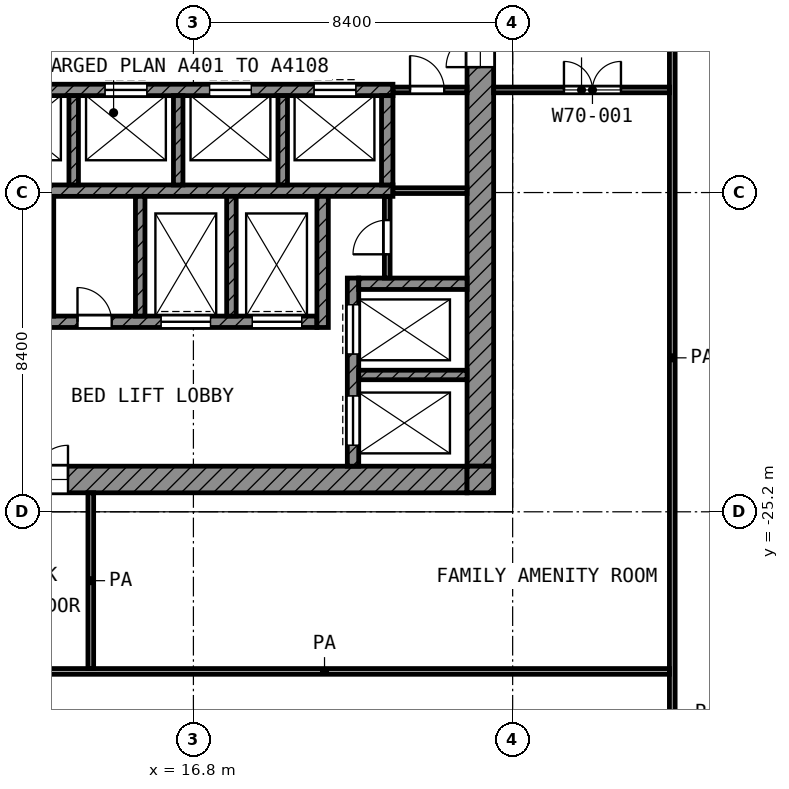
"""IFC4 building model, lengths in metres.
Left out: names, types, materials, properties, quantities, classifications, styles, units other than length and angle.
Written with IfcOpenShell. Run it as: python <this file> out.ifc"""

import sys

from ifc_helpers import new_model, si_unit, direction, frame, frame_2d, origin, place, context, subcontext, project, spatial, rectangle, extrude, element, fill, save


model = new_model("IFC4")
c1 = context("Model", 3, precision=1e-05, world=origin(), true_north=direction((0.0, 1.0)))
c2 = subcontext(c1, "Body", "Model", "MODEL_VIEW")
j1 = project(units=[si_unit("LENGTHUNIT", "METRE"), si_unit("PLANEANGLEUNIT", "RADIAN")], contexts=[c1])
p1 = place(None, origin())
s1 = spatial("IfcSite", under=j1, at=p1, CompositionType="ELEMENT")
p2 = place(p1, origin())
s2 = spatial("IfcBuilding", under=s1, at=p2, CompositionType="ELEMENT")
p3 = place(p2, frame((0.0, 0.0, 302.8)))
s3 = spatial("IfcBuildingStorey", under=s2, at=p3, CompositionType="ELEMENT", Elevation=302.8)
p4 = place(p3, frame((24.35, -24.0, 0.0), z_axis=(0.0, 0.0, 1.0), x_axis=(0.0, 1.0, 0.0)))
e1 = element("IfcWall", 1, at=p4, inside=s3, PredefinedType="SHEAR", context=c2, shape_type="SweptSolid", body=[
    extrude(rectangle(XDim=18.6, YDim=0.7, at=frame_2d((9.3, 0.0))), origin(), (0.0, 0.0, 1.0), 3.6),
])
p5 = place(p4, frame((10.5, 0.0, 0.0)))
e2 = element("IfcOpeningElement", 2, at=p5, cuts=e1, PredefinedType="OPENING", context=c2, shape_type="SweptSolid", body=[
    extrude(rectangle(XDim=1.8, YDim=2.1, at=frame_2d((0.9, 1.05))), frame((0.0, 0.36, 0.0), z_axis=(0.0, -1.0, 0.0), x_axis=(1.0, 0.0, 0.0)), (0.0, 0.0, 1.0), 0.72),
])
p6 = place(p3, frame((5.4, -24.35, 0.0), z_axis=(0.0, 0.0, 1.0), x_axis=(1.0, 0.0, 0.0)))
e3 = element("IfcWall", 3, at=p6, inside=s3, PredefinedType="SHEAR", context=c2, shape_type="SweptSolid", body=[
    extrude(rectangle(XDim=18.6, YDim=0.7, at=frame_2d((9.3, 0.0))), origin(), (0.0, 0.0, 1.0), 3.6),
])
p7 = place(p6, frame((6.3, 0.0, 0.0)))
e4 = element("IfcOpeningElement", 4, at=p7, cuts=e3, PredefinedType="OPENING", context=c2, shape_type="SweptSolid", body=[
    extrude(rectangle(XDim=1.8, YDim=2.1, at=frame_2d((0.9, 1.05))), frame((0.0, 0.36, 0.0), z_axis=(0.0, -1.0, 0.0), x_axis=(1.0, 0.0, 0.0)), (0.0, 0.0, 1.0), 0.72),
])
p8 = place(p3, frame((24.35, -24.7, 0.0), z_axis=(0.0, 0.0, 1.0), x_axis=(0.0, 1.0, 0.0)))
e5 = element("IfcWall", 5, at=p8, inside=s3, PredefinedType="SHEAR", context=c2, shape_type="SweptSolid", body=[
    extrude(rectangle(XDim=0.7, YDim=0.7, at=frame_2d((0.35, 0.0))), origin(), (0.0, 0.0, 1.0), 3.6),
])
p9 = place(p3, frame((5.4, -14.1, 0.0), z_axis=(0.0, 0.0, 1.0), x_axis=(1.0, 0.0, 0.0)))
e6 = element("IfcWall", 6, at=p9, inside=s3, PredefinedType="SHEAR", context=c2, shape_type="SweptSolid", body=[
    extrude(rectangle(XDim=16.65, YDim=0.3, at=frame_2d((8.325, 0.0))), origin(), (0.0, 0.0, 1.0), 3.6),
])
p10 = place(p9, frame((6.325, 0.0, 0.0)))
e7 = element("IfcOpeningElement", 7, at=p10, cuts=e6, PredefinedType="OPENING", context=c2, shape_type="SweptSolid", body=[
    extrude(rectangle(XDim=1.1, YDim=2.1, at=frame_2d((0.55, 1.05))), frame((0.0, 0.16, 0.0), z_axis=(0.0, -1.0, 0.0), x_axis=(1.0, 0.0, 0.0)), (0.0, 0.0, 1.0), 0.32),
])
p11 = place(p9, frame((9.075, 0.0, 0.0)))
e8 = element("IfcOpeningElement", 8, at=p11, cuts=e6, PredefinedType="OPENING", context=c2, shape_type="SweptSolid", body=[
    extrude(rectangle(XDim=1.1, YDim=2.1, at=frame_2d((0.55, 1.05))), frame((0.0, 0.16, 0.0), z_axis=(0.0, -1.0, 0.0), x_axis=(1.0, 0.0, 0.0)), (0.0, 0.0, 1.0), 0.32),
])
p12 = place(p9, frame((11.825, 0.0, 0.0)))
e9 = element("IfcOpeningElement", 9, at=p12, cuts=e6, PredefinedType="OPENING", context=c2, shape_type="SweptSolid", body=[
    extrude(rectangle(XDim=1.1, YDim=2.1, at=frame_2d((0.55, 1.05))), frame((0.0, 0.16, 0.0), z_axis=(0.0, -1.0, 0.0), x_axis=(1.0, 0.0, 0.0)), (0.0, 0.0, 1.0), 0.32),
])
p13 = place(p9, frame((14.575, 0.0, 0.0)))
e10 = element("IfcOpeningElement", 10, at=p13, cuts=e6, PredefinedType="OPENING", context=c2, shape_type="SweptSolid", body=[
    extrude(rectangle(XDim=1.1, YDim=2.1, at=frame_2d((0.55, 1.05))), frame((0.0, 0.16, 0.0), z_axis=(0.0, -1.0, 0.0), x_axis=(1.0, 0.0, 0.0)), (0.0, 0.0, 1.0), 0.32),
])
p14 = place(p9, frame((2.3, 0.0, 0.0)))
e11 = element("IfcOpeningElement", 11, at=p14, cuts=e6, PredefinedType="OPENING", context=c2, shape_type="SweptSolid", body=[
    extrude(rectangle(XDim=0.9, YDim=2.1, at=frame_2d((0.45, 1.05))), frame((0.0, 0.16, 0.0), z_axis=(0.0, -1.0, 0.0), x_axis=(1.0, 0.0, 0.0)), (0.0, 0.0, 1.0), 0.32),
])
p15 = place(p3, frame((5.4, -16.75, 0.0), z_axis=(0.0, 0.0, 1.0), x_axis=(1.0, 0.0, 0.0)))
e12 = element("IfcWall", 12, at=p15, inside=s3, PredefinedType="SHEAR", context=c2, shape_type="SweptSolid", body=[
    extrude(rectangle(XDim=16.65, YDim=0.3, at=frame_2d((8.325, 0.0))), origin(), (0.0, 0.0, 1.0), 3.6),
])
p16 = place(p3, frame((5.4, -20.2, 0.0), z_axis=(0.0, 0.0, 1.0), x_axis=(1.0, 0.0, 0.0)))
e13 = element("IfcWall", 13, at=p16, inside=s3, PredefinedType="SHEAR", context=c2, shape_type="SweptSolid", body=[
    extrude(rectangle(XDim=14.65, YDim=0.3, at=frame_2d((7.325, 0.0))), origin(), (0.0, 0.0, 1.0), 3.6),
])
p17 = place(p16, frame((10.55, 0.0, 0.0)))
e14 = element("IfcOpeningElement", 14, at=p17, cuts=e13, PredefinedType="OPENING", context=c2, shape_type="SweptSolid", body=[
    extrude(rectangle(XDim=1.3, YDim=2.1, at=frame_2d((0.65, 1.05))), frame((0.0, 0.16, 0.0), z_axis=(0.0, -1.0, 0.0), x_axis=(1.0, 0.0, 0.0)), (0.0, 0.0, 1.0), 0.32),
])
p18 = place(p16, frame((12.95, 0.0, 0.0)))
e15 = element("IfcOpeningElement", 15, at=p18, cuts=e13, PredefinedType="OPENING", context=c2, shape_type="SweptSolid", body=[
    extrude(rectangle(XDim=1.3, YDim=2.1, at=frame_2d((0.65, 1.05))), frame((0.0, 0.16, 0.0), z_axis=(0.0, -1.0, 0.0), x_axis=(1.0, 0.0, 0.0)), (0.0, 0.0, 1.0), 0.32),
])
p19 = place(p16, frame((0.55, 0.0, 0.0)))
e16 = element("IfcOpeningElement", 16, at=p19, cuts=e13, PredefinedType="OPENING", context=c2, shape_type="SweptSolid", body=[
    extrude(rectangle(XDim=1.3, YDim=2.1, at=frame_2d((0.65, 1.05))), frame((0.0, 0.16, 0.0), z_axis=(0.0, -1.0, 0.0), x_axis=(1.0, 0.0, 0.0)), (0.0, 0.0, 1.0), 0.32),
])
p20 = place(p16, frame((2.95, 0.0, 0.0)))
e17 = element("IfcOpeningElement", 17, at=p20, cuts=e13, PredefinedType="OPENING", context=c2, shape_type="SweptSolid", body=[
    extrude(rectangle(XDim=1.3, YDim=2.1, at=frame_2d((0.65, 1.05))), frame((0.0, 0.16, 0.0), z_axis=(0.0, -1.0, 0.0), x_axis=(1.0, 0.0, 0.0)), (0.0, 0.0, 1.0), 0.32),
])
p21 = place(p16, frame((5.95, 0.0, 0.0)))
e18 = element("IfcOpeningElement", 18, at=p21, cuts=e13, PredefinedType="OPENING", context=c2, shape_type="SweptSolid", body=[
    extrude(rectangle(XDim=0.9, YDim=2.1, at=frame_2d((0.45, 1.05))), frame((0.0, 0.16, 0.0), z_axis=(0.0, -1.0, 0.0), x_axis=(1.0, 0.0, 0.0)), (0.0, 0.0, 1.0), 0.32),
])
p22 = place(p16, frame((8.35, 0.0, 0.0)))
e19 = element("IfcOpeningElement", 19, at=p22, cuts=e13, PredefinedType="OPENING", context=c2, shape_type="SweptSolid", body=[
    extrude(rectangle(XDim=0.9, YDim=2.1, at=frame_2d((0.45, 1.05))), frame((0.0, 0.16, 0.0), z_axis=(0.0, -1.0, 0.0), x_axis=(1.0, 0.0, 0.0)), (0.0, 0.0, 1.0), 0.32),
])
p23 = place(p3, frame((20.2, -20.35, 0.0), z_axis=(0.0, 0.0, 1.0), x_axis=(0.0, 1.0, 0.0)))
e20 = element("IfcWall", 20, at=p23, inside=s3, PredefinedType="SHEAR", context=c2, shape_type="SweptSolid", body=[
    extrude(rectangle(XDim=3.45, YDim=0.3, at=frame_2d((1.725, 0.0))), origin(), (0.0, 0.0, 1.0), 3.6),
])
p24 = place(p3, frame((21.9, -16.6, 0.0), z_axis=(0.0, 0.0, 1.0), x_axis=(0.0, 1.0, 0.0)))
e21 = element("IfcWall", 21, at=p24, inside=s3, PredefinedType="SHEAR", context=c2, shape_type="SweptSolid", body=[
    extrude(rectangle(XDim=2.35, YDim=0.3, at=frame_2d((1.175, 0.0))), origin(), (0.0, 0.0, 1.0), 3.6),
])
p25 = place(p3, frame((21.15, -19.2, 0.0), z_axis=(0.0, 0.0, 1.0), x_axis=(1.0, 0.0, 0.0)))
e22 = element("IfcWall", 22, at=p25, inside=s3, PredefinedType="SHEAR", context=c2, shape_type="SweptSolid", body=[
    extrude(rectangle(XDim=2.85, YDim=0.3, at=frame_2d((1.425, 0.0))), origin(), (0.0, 0.0, 1.0), 3.6),
])
p26 = place(p3, frame((21.0, -24.0, 0.0), z_axis=(0.0, 0.0, 1.0), x_axis=(0.0, 1.0, 0.0)))
e23 = element("IfcWall", 23, at=p26, inside=s3, PredefinedType="SHEAR", context=c2, shape_type="SweptSolid", body=[
    extrude(rectangle(XDim=4.95, YDim=0.3, at=frame_2d((2.475, 0.0))), origin(), (0.0, 0.0, 1.0), 3.6),
])
p27 = place(p26, frame((2.95, 0.0, 0.0)))
e24 = element("IfcOpeningElement", 24, at=p27, cuts=e23, PredefinedType="OPENING", context=c2, shape_type="SweptSolid", body=[
    extrude(rectangle(XDim=1.3, YDim=2.1, at=frame_2d((0.65, 1.05))), frame((0.0, 0.16, 0.0), z_axis=(0.0, -1.0, 0.0), x_axis=(1.0, 0.0, 0.0)), (0.0, 0.0, 1.0), 0.32),
])
p28 = place(p26, frame((0.55, 0.0, 0.0)))
e25 = element("IfcOpeningElement", 25, at=p28, cuts=e23, PredefinedType="OPENING", context=c2, shape_type="SweptSolid", body=[
    extrude(rectangle(XDim=1.3, YDim=2.1, at=frame_2d((0.65, 1.05))), frame((0.0, 0.16, 0.0), z_axis=(0.0, -1.0, 0.0), x_axis=(1.0, 0.0, 0.0)), (0.0, 0.0, 1.0), 0.32),
])
p29 = place(p3, frame((21.15, -21.6, 0.0), z_axis=(0.0, 0.0, 1.0), x_axis=(1.0, 0.0, 0.0)))
e26 = element("IfcWall", 26, at=p29, inside=s3, PredefinedType="SHEAR", context=c2, shape_type="SweptSolid", body=[
    extrude(rectangle(XDim=2.85, YDim=0.25, at=frame_2d((1.425, 0.0))), origin(), (0.0, 0.0, 1.0), 3.6),
])
for number, where, z_axis, x_axis in (
    (27, (13.0, -20.05, 0.0), (0.0, 0.0, 1.0), (0.0, 1.0, 0.0)),
    (28, (15.4, -20.05, 0.0), (0.0, 0.0, 1.0), (0.0, 1.0, 0.0)),
    (29, (17.8, -20.05, 0.0), (0.0, 0.0, 1.0), (0.0, 1.0, 0.0)),
):
    element("IfcWall", number, at=place(p3, frame(where, z_axis=z_axis, x_axis=x_axis)), inside=s3, PredefinedType="SHEAR", context=c2, shape_type="SweptSolid", body=[
        extrude(rectangle(XDim=3.15, YDim=0.25, at=frame_2d((1.575, 0.0))), origin(), (0.0, 0.0, 1.0), 3.6),
    ])
for number, where, z_axis, x_axis in (
    (30, (13.65, -16.6, 0.0), (0.0, 0.0, 1.0), (0.0, 1.0, 0.0)),
    (31, (16.4, -16.6, 0.0), (0.0, 0.0, 1.0), (0.0, 1.0, 0.0)),
    (32, (19.15, -16.6, 0.0), (0.0, 0.0, 1.0), (0.0, 1.0, 0.0)),
):
    element("IfcWall", number, at=place(p3, frame(where, z_axis=z_axis, x_axis=x_axis)), inside=s3, PredefinedType="SHEAR", context=c2, shape_type="SweptSolid", body=[
        extrude(rectangle(XDim=2.35, YDim=0.25, at=frame_2d((1.175, 0.0))), origin(), (0.0, 0.0, 1.0), 3.6),
    ])
p30 = place(p3, frame((21.9, -19.05, 0.0), z_axis=(0.0, 0.0, 1.0), x_axis=(0.0, 1.0, 0.0)))
e33 = element("IfcWall", 33, at=p30, inside=s3, PredefinedType="PARTITIONING", context=c2, shape_type="SweptSolid", body=[
    extrude(rectangle(XDim=2.15, YDim=0.15, at=frame_2d((1.075, 0.0))), origin(), (0.0, 0.0, 1.0), 3.6),
])
p31 = place(p30, frame((0.625, 0.0, 0.0)))
e34 = element("IfcOpeningElement", 34, at=p31, cuts=e33, PredefinedType="OPENING", context=c2, shape_type="SweptSolid", body=[
    extrude(rectangle(XDim=0.9, YDim=2.1, at=frame_2d((0.45, 1.05))), frame((0.0, 0.085, 0.0), z_axis=(0.0, -1.0, 0.0), x_axis=(1.0, 0.0, 0.0)), (0.0, 0.0, 1.0), 0.17),
])
p32 = place(p3, frame((22.05, -16.75, 0.0), z_axis=(0.0, 0.0, 1.0), x_axis=(1.0, 0.0, 0.0)))
e35 = element("IfcWall", 35, at=p32, inside=s3, PredefinedType="PARTITIONING", context=c2, shape_type="SweptSolid", body=[
    extrude(rectangle(XDim=1.95, YDim=0.15, at=frame_2d((0.975, 0.0))), origin(), (0.0, 0.0, 1.0), 3.6),
])
p33 = place(p3, frame((22.05, -14.1, 0.0), z_axis=(0.0, 0.0, 1.0), x_axis=(1.0, 0.0, 0.0)))
e36 = element("IfcWall", 36, at=p33, inside=s3, PredefinedType="PARTITIONING", context=c2, shape_type="SweptSolid", body=[
    extrude(rectangle(XDim=1.95, YDim=0.15, at=frame_2d((0.975, 0.0))), origin(), (0.0, 0.0, 1.0), 3.6),
])
p34 = place(p33, frame((0.45, 0.0, 0.0)))
e37 = element("IfcOpeningElement", 37, at=p34, cuts=e36, PredefinedType="OPENING", context=c2, shape_type="SweptSolid", body=[
    extrude(rectangle(XDim=0.9, YDim=2.1, at=frame_2d((0.45, 1.05))), frame((0.0, 0.085, 0.0), z_axis=(0.0, -1.0, 0.0), x_axis=(1.0, 0.0, 0.0)), (0.0, 0.0, 1.0), 0.17),
])
p35 = place(p3, frame((11.175, -29.4, 0.0), z_axis=(0.0, 0.0, 1.0), x_axis=(1.0, 0.0, 0.0)))
e38 = element("IfcWall", 38, at=p35, inside=s3, PredefinedType="PARTITIONING", context=c2, shape_type="SweptSolid", body=[
    extrude(rectangle(XDim=18.15, YDim=0.15, at=frame_2d((9.075, 0.0))), origin(), (0.0, 0.0, 1.0), 3.6),
])
p36 = place(p3, frame((24.7, -14.1, 0.0), z_axis=(0.0, 0.0, 1.0), x_axis=(1.0, 0.0, 0.0)))
e39 = element("IfcWall", 39, at=p36, inside=s3, PredefinedType="PARTITIONING", context=c2, shape_type="SweptSolid", body=[
    extrude(rectangle(XDim=4.625, YDim=0.15, at=frame_2d((2.312, 0.0))), origin(), (0.0, 0.0, 1.0), 3.6),
])
p37 = place(p36, frame((1.85, 0.0, 0.0)))
e40 = element("IfcOpeningElement", 40, at=p37, cuts=e39, PredefinedType="OPENING", context=c2, shape_type="SweptSolid", body=[
    extrude(rectangle(XDim=1.5, YDim=2.1, at=frame_2d((0.75, 1.05))), frame((0.0, 0.085, 0.0), z_axis=(0.0, -1.0, 0.0), x_axis=(1.0, 0.0, 0.0)), (0.0, 0.0, 1.0), 0.17),
])
p38 = place(p3, frame((14.1, -29.325, 0.0), z_axis=(0.0, 0.0, 1.0), x_axis=(0.0, 1.0, 0.0)))
e41 = element("IfcWall", 41, at=p38, inside=s3, PredefinedType="PARTITIONING", context=c2, shape_type="SweptSolid", body=[
    extrude(rectangle(XDim=4.625, YDim=0.15, at=frame_2d((2.312, 0.0))), origin(), (0.0, 0.0, 1.0), 3.6),
])
p39 = place(p3, frame((29.4, -31.198, 0.0), z_axis=(0.0, 0.0, 1.0), x_axis=(0.0, 1.0, 0.0)))
e42 = element("IfcWall", 42, at=p39, inside=s3, PredefinedType="PARTITIONING", context=c2, shape_type="SweptSolid", body=[
    extrude(rectangle(XDim=20.098, YDim=0.15, at=frame_2d((10.049, 0.0))), origin(), (0.0, 0.0, 1.0), 3.6),
])
p40 = place(p11, origin())
e43 = element("IfcDoor", 43, at=p40, inside=s3, OperationType="DOUBLE_DOOR_SLIDING", PredefinedType="DOOR", context=c2, shape_type="SweptSolid", body=[
    extrude(rectangle(XDim=1.1, YDim=2.1, at=frame_2d((0.55, 1.05))), frame((0.0, 0.025, 0.0), z_axis=(0.0, -1.0, 0.0), x_axis=(1.0, 0.0, 0.0)), (0.0, 0.0, 1.0), 0.05),
])
fill(e8, e43)
p41 = place(p12, origin())
e44 = element("IfcDoor", 44, at=p41, inside=s3, OperationType="DOUBLE_DOOR_SLIDING", PredefinedType="DOOR", context=c2, shape_type="SweptSolid", body=[
    extrude(rectangle(XDim=1.1, YDim=2.1, at=frame_2d((0.55, 1.05))), frame((0.0, 0.025, 0.0), z_axis=(0.0, -1.0, 0.0), x_axis=(1.0, 0.0, 0.0)), (0.0, 0.0, 1.0), 0.05),
])
fill(e9, e44)
p42 = place(p13, origin())
e45 = element("IfcDoor", 45, at=p42, inside=s3, OperationType="DOUBLE_DOOR_SLIDING", PredefinedType="DOOR", context=c2, shape_type="SweptSolid", body=[
    extrude(rectangle(XDim=1.1, YDim=2.1, at=frame_2d((0.55, 1.05))), frame((0.0, 0.025, 0.0), z_axis=(0.0, -1.0, 0.0), x_axis=(1.0, 0.0, 0.0)), (0.0, 0.0, 1.0), 0.05),
])
fill(e10, e45)
p43 = place(p27, origin())
e46 = element("IfcDoor", 46, at=p43, inside=s3, OperationType="DOUBLE_DOOR_SLIDING", PredefinedType="DOOR", context=c2, shape_type="SweptSolid", body=[
    extrude(rectangle(XDim=1.3, YDim=2.1, at=frame_2d((0.65, 1.05))), frame((0.0, 0.025, 0.0), z_axis=(0.0, -1.0, 0.0), x_axis=(1.0, 0.0, 0.0)), (0.0, 0.0, 1.0), 0.05),
])
fill(e24, e46)
p44 = place(p28, origin())
e47 = element("IfcDoor", 47, at=p44, inside=s3, OperationType="DOUBLE_DOOR_SLIDING", PredefinedType="DOOR", context=c2, shape_type="SweptSolid", body=[
    extrude(rectangle(XDim=1.3, YDim=2.1, at=frame_2d((0.65, 1.05))), frame((0.0, 0.025, 0.0), z_axis=(0.0, -1.0, 0.0), x_axis=(1.0, 0.0, 0.0)), (0.0, 0.0, 1.0), 0.05),
])
fill(e25, e47)
p45 = place(p17, origin())
e48 = element("IfcDoor", 48, at=p45, inside=s3, OperationType="DOUBLE_DOOR_SLIDING", PredefinedType="DOOR", context=c2, shape_type="SweptSolid", body=[
    extrude(rectangle(XDim=1.3, YDim=2.1, at=frame_2d((0.65, 1.05))), frame((0.0, 0.025, 0.0), z_axis=(0.0, -1.0, 0.0), x_axis=(1.0, 0.0, 0.0)), (0.0, 0.0, 1.0), 0.05),
])
fill(e14, e48)
p46 = place(p18, origin())
e49 = element("IfcDoor", 49, at=p46, inside=s3, OperationType="DOUBLE_DOOR_SLIDING", PredefinedType="DOOR", context=c2, shape_type="SweptSolid", body=[
    extrude(rectangle(XDim=1.3, YDim=2.1, at=frame_2d((0.65, 1.05))), frame((0.0, 0.025, 0.0), z_axis=(0.0, -1.0, 0.0), x_axis=(1.0, 0.0, 0.0)), (0.0, 0.0, 1.0), 0.05),
])
fill(e15, e49)
p47 = place(p5, origin())
e50 = element("IfcDoor", 50, at=p47, inside=s3, OperationType="DOUBLE_DOOR_SINGLE_SWING", PredefinedType="DOOR", context=c2, shape_type="SweptSolid", body=[
    extrude(rectangle(XDim=1.8, YDim=2.1, at=frame_2d((0.9, 1.05))), frame((0.0, 0.025, 0.0), z_axis=(0.0, -1.0, 0.0), x_axis=(1.0, 0.0, 0.0)), (0.0, 0.0, 1.0), 0.05),
])
fill(e2, e50)
p48 = place(p7, origin())
e51 = element("IfcDoor", 51, at=p48, inside=s3, OperationType="DOUBLE_DOOR_SINGLE_SWING", PredefinedType="DOOR", context=c2, shape_type="SweptSolid", body=[
    extrude(rectangle(XDim=1.8, YDim=2.1, at=frame_2d((0.9, 1.05))), frame((0.0, 0.025, 0.0), z_axis=(0.0, -1.0, 0.0), x_axis=(1.0, 0.0, 0.0)), (0.0, 0.0, 1.0), 0.05),
])
fill(e4, e51)
p49 = place(p34, origin())
e52 = element("IfcDoor", 52, at=p49, inside=s3, OperationType="SINGLE_SWING_LEFT", PredefinedType="DOOR", context=c2, shape_type="SweptSolid", body=[
    extrude(rectangle(XDim=0.9, YDim=2.1, at=frame_2d((0.45, 1.05))), frame((0.0, 0.025, 0.0), z_axis=(0.0, -1.0, 0.0), x_axis=(1.0, 0.0, 0.0)), (0.0, 0.0, 1.0), 0.05),
])
fill(e37, e52)
p50 = place(p31, origin())
e53 = element("IfcDoor", 53, at=p50, inside=s3, OperationType="SINGLE_SWING_LEFT", PredefinedType="DOOR", context=c2, shape_type="SweptSolid", body=[
    extrude(rectangle(XDim=0.9, YDim=2.1, at=frame_2d((0.45, 1.05))), frame((0.0, 0.025, 0.0), z_axis=(0.0, -1.0, 0.0), x_axis=(1.0, 0.0, 0.0)), (0.0, 0.0, 1.0), 0.05),
])
fill(e34, e53)
p51 = place(p22, origin())
e54 = element("IfcDoor", 54, at=p51, inside=s3, OperationType="SINGLE_SWING_LEFT", PredefinedType="DOOR", context=c2, shape_type="SweptSolid", body=[
    extrude(rectangle(XDim=0.9, YDim=2.1, at=frame_2d((0.45, 1.05))), frame((0.0, 0.025, 0.0), z_axis=(0.0, -1.0, 0.0), x_axis=(1.0, 0.0, 0.0)), (0.0, 0.0, 1.0), 0.05),
])
fill(e19, e54)
p52 = place(p37, origin())
e55 = element("IfcDoor", 55, at=p52, inside=s3, OperationType="DOUBLE_DOOR_SINGLE_SWING", PredefinedType="DOOR", context=c2, shape_type="SweptSolid", body=[
    extrude(rectangle(XDim=1.5, YDim=2.1, at=frame_2d((0.75, 1.05))), frame((0.0, 0.025, 0.0), z_axis=(0.0, -1.0, 0.0), x_axis=(1.0, 0.0, 0.0)), (0.0, 0.0, 1.0), 0.05),
])
fill(e40, e55)
save(model, sys.argv[1])
